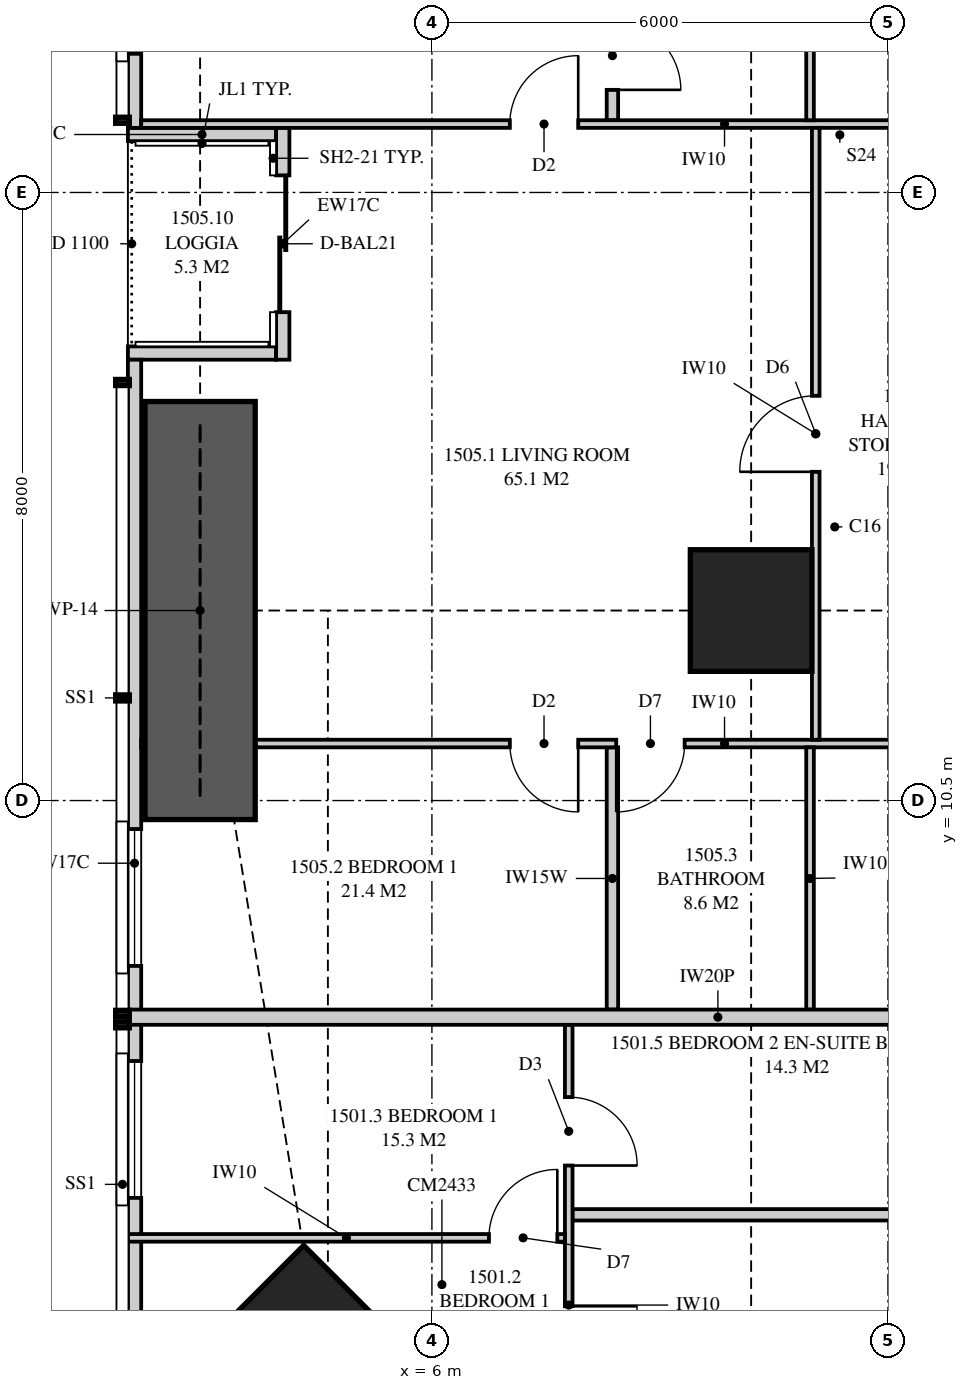
"""IFC4 building model, lengths in metres.
Left out: names, types, materials, properties, quantities, classifications, styles, units other than length and angle.
Written with IfcOpenShell. Run it as: python <this file> out.ifc"""

import sys

from ifc_helpers import new_model, si_unit, direction, frame, frame_2d, origin, origin_2d, place, context, subcontext, project, spatial, polyline, rectangle, outline, extrude, element, fill, save


model = new_model("IFC4")
c1 = context("Model", 3, precision=1e-05, world=origin(), true_north=direction((0.0, 1.0)))
c2 = subcontext(c1, "Body", "Model", "MODEL_VIEW")
j1 = project(units=[si_unit("LENGTHUNIT", "METRE"), si_unit("PLANEANGLEUNIT", "RADIAN")], contexts=[c1])
p1 = place(None, origin())
s1 = spatial("IfcSite", under=j1, at=p1, CompositionType="ELEMENT")
p2 = place(p1, origin())
s2 = spatial("IfcBuilding", under=s1, at=p2, CompositionType="ELEMENT")
p3 = place(p2, frame((0.0, 0.0, 57.85)))
s3 = spatial("IfcBuildingStorey", under=s2, at=p3, CompositionType="ELEMENT", Elevation=57.85)
p4 = place(p3, frame((4.631, 2.631, 0.0), z_axis=(0.0, 0.0, 1.0), x_axis=(0.707106781187, 0.707106781187, 0.0)))
e1 = element("IfcColumn", 1, at=p4, inside=s3, PredefinedType="COLUMN", context=c2, shape_type="SweptSolid", body=[
    extrude(rectangle(XDim=2.4, YDim=3.3, at=origin_2d()), origin(), (0.0, 0.0, 1.0), 3.35),
])
p5 = place(p3, frame((10.2, 13.0, 0.0), z_axis=(0.0, 0.0, 1.0), x_axis=(1.0, 0.0, 0.0)))
e2 = element("IfcColumn", 2, at=p5, inside=s3, PredefinedType="COLUMN", context=c2, shape_type="SweptSolid", body=[
    extrude(rectangle(XDim=1.6, YDim=1.6, at=origin_2d()), origin(), (0.0, 0.0, 1.0), 3.35),
])
p6 = place(p3, frame((2.087, 34.949, 0.0), z_axis=(0.0, 0.0, 1.0), x_axis=(0.0, -1.0, 0.0)))
e3 = element("IfcWall", 3, at=p6, inside=s3, PredefinedType="SOLIDWALL", context=c2, shape_type="SweptSolid", body=[
    extrude(outline(polyline([(0.0, 0.0), (15.599, 0.0), (15.599, 2.15), (9.949, 2.15), (9.949, 3.11), (9.823, 3.11), (9.823, 2.15), (9.73, 2.15), (9.73, 3.11), (0.0, 3.11), (0.0, 0.0)])), frame((0.0, 0.087, 0.0), z_axis=(0.0, -1.0, 0.0), x_axis=(1.0, 0.0, 0.0)), (0.0, 0.0, 1.0), 0.175),
])
p7 = place(p6, frame((2.722, 0.0, 0.4)))
e4 = element("IfcOpeningElement", 4, at=p7, cuts=e3, PredefinedType="OPENING", context=c2, shape_type="SweptSolid", body=[
    extrude(rectangle(XDim=1.8, YDim=1.7, at=frame_2d((0.9, 0.85))), frame((0.0, 0.097, 0.0), z_axis=(0.0, -1.0, 0.0), x_axis=(1.0, 0.0, 0.0)), (0.0, 0.0, 1.0), 0.195),
])
p8 = place(p6, frame((5.899, 0.0, 0.4)))
e5 = element("IfcOpeningElement", 5, at=p8, cuts=e3, PredefinedType="OPENING", context=c2, shape_type="SweptSolid", body=[
    extrude(rectangle(XDim=1.2, YDim=1.7, at=frame_2d((0.6, 0.85))), frame((0.0, 0.097, 0.0), z_axis=(0.0, -1.0, 0.0), x_axis=(1.0, 0.0, 0.0)), (0.0, 0.0, 1.0), 0.195),
])
p9 = place(p6, frame((12.824, 0.0, 0.4)))
e6 = element("IfcOpeningElement", 6, at=p9, cuts=e3, PredefinedType="OPENING", context=c2, shape_type="SweptSolid", body=[
    extrude(rectangle(XDim=1.8, YDim=1.7, at=frame_2d((0.9, 0.85))), frame((0.0, 0.097, 0.0), z_axis=(0.0, -1.0, 0.0), x_axis=(1.0, 0.0, 0.0)), (0.0, 0.0, 1.0), 0.195),
])
p10 = place(p3, frame((2.087, 16.3, 0.0), z_axis=(0.0, 0.0, 1.0), x_axis=(0.0, -1.0, 0.0)))
e7 = element("IfcWall", 7, at=p10, inside=s3, PredefinedType="SOLIDWALL", context=c2, shape_type="SweptSolid", body=[
    extrude(outline(polyline([(0.0, 0.0), (13.249, 0.0), (13.249, 3.11), (3.519, 3.11), (3.519, 2.15), (3.426, 2.15), (3.426, 3.11), (3.3, 3.11), (3.3, 2.15), (0.0, 2.15), (0.0, 0.0)])), frame((0.0, 0.087, 0.0), z_axis=(0.0, -1.0, 0.0), x_axis=(1.0, 0.0, 0.0)), (0.0, 0.0, 1.0), 0.175),
])
p11 = place(p10, frame((6.175, 0.0, 0.4)))
e8 = element("IfcOpeningElement", 8, at=p11, cuts=e7, PredefinedType="OPENING", context=c2, shape_type="SweptSolid", body=[
    extrude(rectangle(XDim=1.8, YDim=1.7, at=frame_2d((0.9, 0.85))), frame((0.0, 0.097, 0.0), z_axis=(0.0, -1.0, 0.0), x_axis=(1.0, 0.0, 0.0)), (0.0, 0.0, 1.0), 0.195),
])
p12 = place(p10, frame((9.227, 0.0, 0.4)))
e9 = element("IfcOpeningElement", 9, at=p12, cuts=e7, PredefinedType="OPENING", context=c2, shape_type="SweptSolid", body=[
    extrude(rectangle(XDim=1.8, YDim=1.7, at=frame_2d((0.9, 0.85))), frame((0.0, 0.097, 0.0), z_axis=(0.0, -1.0, 0.0), x_axis=(1.0, 0.0, 0.0)), (0.0, 0.0, 1.0), 0.195),
])
p13 = place(p3, frame((4.038, 19.35, 0.0), z_axis=(0.0, 0.0, 1.0), x_axis=(0.0, -1.0, 0.0)))
e10 = element("IfcWall", 10, at=p13, inside=s3, PredefinedType="SOLIDWALL", context=c2, shape_type="SweptSolid", body=[
    extrude(rectangle(XDim=3.05, YDim=0.175, at=frame_2d((1.525, 0.0))), origin(), (0.0, 0.0, 1.0), 3.11),
])
p14 = place(p13, frame((0.625, 0.0, 0.0)))
e11 = element("IfcOpeningElement", 11, at=p14, cuts=e10, PredefinedType="OPENING", context=c2, shape_type="SweptSolid", body=[
    extrude(rectangle(XDim=1.8, YDim=2.1, at=frame_2d((0.9, 1.05))), frame((0.0, 0.097, 0.0), z_axis=(0.0, -1.0, 0.0), x_axis=(1.0, 0.0, 0.0)), (0.0, 0.0, 1.0), 0.195),
])
for number, where, z_axis, x_axis in (
    (12, (2.0, 19.262, 0.0), (0.0, 0.0, 1.0), (1.0, 0.0, 0.0)),
    (13, (2.0, 16.387, 0.0), (0.0, 0.0, 1.0), (1.0, 0.0, 0.0)),
):
    element("IfcWall", number, at=place(p3, frame(where, z_axis=z_axis, x_axis=x_axis)), inside=s3, PredefinedType="SOLIDWALL", context=c2, shape_type="SweptSolid", body=[
        extrude(outline(polyline([(0.0, 0.0), (1.95, 0.0), (1.95, 3.11), (1.75, 3.11), (1.75, 2.15), (0.15, 2.15), (0.15, 3.11), (0.0, 3.11), (0.0, 0.0)])), frame((0.0, 0.087, 0.0), z_axis=(0.0, -1.0, 0.0), x_axis=(1.0, 0.0, 0.0)), (0.0, 0.0, 1.0), 0.175),
    ])
p15 = place(p3, frame((7.8, 0.175, 0.0), z_axis=(0.0, 0.0, 1.0), x_axis=(0.0, 1.0, 0.0)))
e14 = element("IfcWall", 14, at=p15, inside=s3, PredefinedType="PARTITIONING", context=c2, shape_type="SweptSolid", body=[
    extrude(outline(polyline([(0.0, 0.0), (7.375, 0.0), (7.375, 3.11), (2.697, 3.11), (2.697, 2.15), (0.943, 2.15), (0.943, 3.11), (0.0, 3.11), (0.0, 0.0)])), frame((0.0, 0.05, 0.0), z_axis=(0.0, -1.0, 0.0), x_axis=(1.0, 0.0, 0.0)), (0.0, 0.0, 1.0), 0.1),
])
p16 = place(p15, frame((2.772, 0.0, 0.0)))
e15 = element("IfcOpeningElement", 15, at=p16, cuts=e14, PredefinedType="OPENING", context=c2, shape_type="SweptSolid", body=[
    extrude(rectangle(XDim=0.9, YDim=2.1, at=frame_2d((0.45, 1.05))), frame((0.0, 0.06, 0.0), z_axis=(0.0, -1.0, 0.0), x_axis=(1.0, 0.0, 0.0)), (0.0, 0.0, 1.0), 0.12),
])
p17 = place(p15, frame((5.523, 0.0, 0.0)))
e16 = element("IfcOpeningElement", 16, at=p17, cuts=e14, PredefinedType="OPENING", context=c2, shape_type="SweptSolid", body=[
    extrude(rectangle(XDim=0.9, YDim=2.1, at=frame_2d((0.45, 1.05))), frame((0.0, 0.06, 0.0), z_axis=(0.0, -1.0, 0.0), x_axis=(1.0, 0.0, 0.0)), (0.0, 0.0, 1.0), 0.12),
])
p18 = place(p3, frame((2.0, 4.747, 0.0), z_axis=(0.0, 0.0, 1.0), x_axis=(1.0, 0.0, 0.0)))
e17 = element("IfcWall", 17, at=p18, inside=s3, PredefinedType="PARTITIONING", context=c2, shape_type="SweptSolid", body=[
    extrude(outline(polyline([(0.0, 0.0), (5.75, 0.0), (5.75, 3.11), (3.16, 3.11), (3.16, 2.15), (1.417, 2.15), (1.417, 3.11), (0.0, 3.11), (0.0, 0.0)])), frame((0.0, 0.05, 0.0), z_axis=(0.0, -1.0, 0.0), x_axis=(1.0, 0.0, 0.0)), (0.0, 0.0, 1.0), 0.1),
])
p19 = place(p18, frame((4.75, 0.0, 0.0)))
e18 = element("IfcOpeningElement", 18, at=p19, cuts=e17, PredefinedType="OPENING", context=c2, shape_type="SweptSolid", body=[
    extrude(rectangle(XDim=0.9, YDim=2.1, at=frame_2d((0.45, 1.05))), frame((0.0, 0.06, 0.0), z_axis=(0.0, -1.0, 0.0), x_axis=(1.0, 0.0, 0.0)), (0.0, 0.0, 1.0), 0.12),
])
p20 = place(p3, frame((7.85, 5.05, 0.0), z_axis=(0.0, 0.0, 1.0), x_axis=(1.0, 0.0, 0.0)))
e19 = element("IfcWall", 19, at=p20, inside=s3, PredefinedType="PLUMBINGWALL", context=c2, shape_type="SweptSolid", body=[
    extrude(outline(polyline([(0.0, 0.0), (5.9, 0.0), (5.9, 3.11), (5.462, 3.11), (5.462, 2.541), (4.838, 2.541), (4.838, 3.11), (3.635, 3.11), (3.635, 2.51), (1.065, 2.51), (1.065, 3.11), (0.0, 3.11), (0.0, 0.0)])), frame((0.0, 0.075, 0.0), z_axis=(0.0, -1.0, 0.0), x_axis=(1.0, 0.0, 0.0)), (0.0, 0.0, 1.0), 0.15),
])
p21 = place(p20, frame((4.6, 0.0, 0.0)))
e20 = element("IfcOpeningElement", 20, at=p21, cuts=e19, PredefinedType="OPENING", context=c2, shape_type="SweptSolid", body=[
    extrude(rectangle(XDim=0.9, YDim=2.1, at=frame_2d((0.45, 1.05))), frame((0.0, 0.085, 0.0), z_axis=(0.0, -1.0, 0.0), x_axis=(1.0, 0.0, 0.0)), (0.0, 0.0, 1.0), 0.17),
])
p22 = place(p3, frame((2.0, 7.65, 0.0), z_axis=(0.0, 0.0, 1.0), x_axis=(1.0, 0.0, 0.0)))
e21 = element("IfcWall", 21, at=p22, inside=s3, PredefinedType="PARTITIONING", context=c2, shape_type="SweptSolid", body=[
    extrude(outline(polyline([(0.0, 0.0), (15.525, 0.0), (15.525, 3.11), (11.337, 3.11), (11.337, 2.541), (10.663, 2.541), (10.663, 3.11), (9.51, 3.11), (9.51, 2.51), (6.89, 2.51), (6.89, 3.11), (2.969, 3.11), (2.969, 2.541), (2.74, 2.541), (2.74, 2.15), (0.896, 2.15), (0.896, 3.11), (0.0, 3.11), (0.0, 0.0)])), frame((0.0, 0.1, 0.0), z_axis=(0.0, -1.0, 0.0), x_axis=(1.0, 0.0, 0.0)), (0.0, 0.0, 1.0), 0.2),
])
p23 = place(p3, frame((2.175, 11.25, 0.0), z_axis=(0.0, 0.0, 1.0), x_axis=(1.0, 0.0, 0.0)))
e22 = element("IfcWall", 22, at=p23, inside=s3, PredefinedType="PARTITIONING", context=c2, shape_type="SweptSolid", body=[
    extrude(outline(polyline([(0.188, 3.11), (0.0, 3.11), (0.0, 0.0), (0.529, 0.0), (0.529, 0.273), (1.021, 0.273), (1.021, 0.0), (15.35, 0.0), (15.35, 3.11), (11.112, 3.11), (11.112, 2.541), (10.538, 2.541), (10.538, 3.11), (9.285, 3.11), (9.285, 2.51), (6.765, 2.51), (6.765, 3.11), (2.744, 3.11), (2.744, 2.541), (2.169, 2.541), (2.169, 3.11), (1.93, 3.11), (1.93, 2.15), (1.021, 2.15), (1.021, 1.876), (0.529, 1.876), (0.529, 2.15), (0.188, 2.15), (0.188, 3.11)])), frame((0.0, 0.05, 0.0), z_axis=(0.0, -1.0, 0.0), x_axis=(1.0, 0.0, 0.0)), (0.0, 0.0, 1.0), 0.1),
])
p24 = place(p23, frame((4.85, 0.0, 0.0)))
e23 = element("IfcOpeningElement", 23, at=p24, cuts=e22, PredefinedType="OPENING", context=c2, shape_type="SweptSolid", body=[
    extrude(rectangle(XDim=0.9, YDim=2.1, at=frame_2d((0.45, 1.05))), frame((0.0, 0.06, 0.0), z_axis=(0.0, -1.0, 0.0), x_axis=(1.0, 0.0, 0.0)), (0.0, 0.0, 1.0), 0.12),
])
p25 = place(p23, frame((6.25, 0.0, 0.0)))
e24 = element("IfcOpeningElement", 24, at=p25, cuts=e22, PredefinedType="OPENING", context=c2, shape_type="SweptSolid", body=[
    extrude(rectangle(XDim=0.9, YDim=2.1, at=frame_2d((0.45, 1.05))), frame((0.0, 0.06, 0.0), z_axis=(0.0, -1.0, 0.0), x_axis=(1.0, 0.0, 0.0)), (0.0, 0.0, 1.0), 0.12),
])
p26 = place(p23, frame((11.675, 0.0, 0.0)))
e25 = element("IfcOpeningElement", 25, at=p26, cuts=e22, PredefinedType="OPENING", context=c2, shape_type="SweptSolid", body=[
    extrude(rectangle(XDim=0.7, YDim=2.1, at=frame_2d((0.35, 1.05))), frame((0.0, 0.06, 0.0), z_axis=(0.0, -1.0, 0.0), x_axis=(1.0, 0.0, 0.0)), (0.0, 0.0, 1.0), 0.12),
])
p27 = place(p3, frame((2.175, 19.4, 0.0), z_axis=(0.0, 0.0, 1.0), x_axis=(1.0, 0.0, 0.0)))
e26 = element("IfcWall", 26, at=p27, inside=s3, PredefinedType="PARTITIONING", context=c2, shape_type="SweptSolid", body=[
    extrude(outline(polyline([(0.0, 0.0), (15.35, 0.0), (15.35, 3.11), (9.285, 3.11), (9.285, 2.51), (6.765, 2.51), (6.765, 3.11), (1.635, 3.11), (1.635, 2.15), (0.0, 2.15), (0.0, 3.11), (0.0, 0.0)])), frame((0.0, 0.05, 0.0), z_axis=(0.0, -1.0, 0.0), x_axis=(1.0, 0.0, 0.0)), (0.0, 0.0, 1.0), 0.1),
])
p28 = place(p27, frame((4.85, 0.0, 0.0)))
e27 = element("IfcOpeningElement", 27, at=p28, cuts=e26, PredefinedType="OPENING", context=c2, shape_type="SweptSolid", body=[
    extrude(rectangle(XDim=0.9, YDim=2.1, at=frame_2d((0.45, 1.05))), frame((0.0, 0.06, 0.0), z_axis=(0.0, -1.0, 0.0), x_axis=(1.0, 0.0, 0.0)), (0.0, 0.0, 1.0), 0.12),
])
p29 = place(p27, frame((11.675, 0.0, 0.0)))
e28 = element("IfcOpeningElement", 28, at=p29, cuts=e26, PredefinedType="OPENING", context=c2, shape_type="SweptSolid", body=[
    extrude(rectangle(XDim=0.7, YDim=2.1, at=frame_2d((0.35, 1.05))), frame((0.0, 0.06, 0.0), z_axis=(0.0, -1.0, 0.0), x_axis=(1.0, 0.0, 0.0)), (0.0, 0.0, 1.0), 0.12),
])
p30 = place(p3, frame((8.375, 7.75, 0.0), z_axis=(0.0, 0.0, 1.0), x_axis=(0.0, 1.0, 0.0)))
e29 = element("IfcWall", 29, at=p30, inside=s3, PredefinedType="PLUMBINGWALL", context=c2, shape_type="SweptSolid", body=[
    extrude(rectangle(XDim=3.45, YDim=0.15, at=frame_2d((1.725, 0.0))), origin(), (0.0, 0.0, 1.0), 3.11),
])
p31 = place(p3, frame((10.975, 7.75, 0.0), z_axis=(0.0, 0.0, 1.0), x_axis=(0.0, 1.0, 0.0)))
e30 = element("IfcWall", 30, at=p31, inside=s3, PredefinedType="PARTITIONING", context=c2, shape_type="SweptSolid", body=[
    extrude(outline(polyline([(0.0, 0.0), (3.45, 0.0), (3.45, 3.11), (3.45, 2.51), (0.0, 2.51), (0.0, 3.11), (0.0, 0.0)])), frame((0.0, 0.05, 0.0), z_axis=(0.0, -1.0, 0.0), x_axis=(1.0, 0.0, 0.0)), (0.0, 0.0, 1.0), 0.1),
])
p32 = place(p3, frame((8.375, 19.45, 0.0), z_axis=(0.0, 0.0, 1.0), x_axis=(0.0, 1.0, 0.0)))
e31 = element("IfcWall", 31, at=p32, inside=s3, PredefinedType="PLUMBINGWALL", context=c2, shape_type="SweptSolid", body=[
    extrude(rectangle(XDim=4.55, YDim=0.15, at=frame_2d((2.275, 0.0))), origin(), (0.0, 0.0, 1.0), 3.11),
])
p33 = place(p32, frame((0.4, 0.0, 0.0)))
e32 = element("IfcOpeningElement", 32, at=p33, cuts=e31, PredefinedType="OPENING", context=c2, shape_type="SweptSolid", body=[
    extrude(rectangle(XDim=0.9, YDim=2.1, at=frame_2d((0.45, 1.05))), frame((0.0, 0.085, 0.0), z_axis=(0.0, -1.0, 0.0), x_axis=(1.0, 0.0, 0.0)), (0.0, 0.0, 1.0), 0.17),
])
p34 = place(p3, frame((10.975, 19.45, 0.0), z_axis=(0.0, 0.0, 1.0), x_axis=(0.0, 1.0, 0.0)))
e33 = element("IfcWall", 33, at=p34, inside=s3, PredefinedType="PARTITIONING", context=c2, shape_type="SweptSolid", body=[
    extrude(outline(polyline([(0.0, 0.0), (4.55, 0.0), (4.55, 3.11), (4.55, 2.51), (0.0, 2.51), (0.0, 3.11), (0.0, 0.0)])), frame((0.0, 0.05, 0.0), z_axis=(0.0, -1.0, 0.0), x_axis=(1.0, 0.0, 0.0)), (0.0, 0.0, 1.0), 0.1),
])
p35 = place(p3, frame((11.05, 11.3, 0.0), z_axis=(0.0, 0.0, 1.0), x_axis=(0.0, 1.0, 0.0)))
e34 = element("IfcWall", 34, at=p35, inside=s3, PredefinedType="PARTITIONING", context=c2, shape_type="SweptSolid", body=[
    extrude(rectangle(XDim=8.05, YDim=0.1, at=frame_2d((4.025, 0.0))), origin(), (0.0, 0.0, 1.0), 2.51),
])
p36 = place(p35, frame((3.525, 0.0, 0.0)))
e35 = element("IfcOpeningElement", 35, at=p36, cuts=e34, PredefinedType="OPENING", context=c2, shape_type="SweptSolid", body=[
    extrude(rectangle(XDim=1.0, YDim=2.1, at=frame_2d((0.5, 1.05))), frame((0.0, 0.06, 0.0), z_axis=(0.0, -1.0, 0.0), x_axis=(1.0, 0.0, 0.0)), (0.0, 0.0, 1.0), 0.12),
])
p37 = place(p3, frame((2.95, 10.25, 0.0), z_axis=(0.0, 0.0, 1.0), x_axis=(0.0, 1.0, 0.0)))
e36 = element("IfcWall", 36, at=p37, inside=s3, PredefinedType="SHEAR", context=c2, shape_type="SweptSolid", body=[
    extrude(rectangle(XDim=5.5, YDim=1.45, at=frame_2d((2.75, 0.0))), origin(), (0.0, 0.0, 1.0), 3.35),
])
p38 = place(p9, origin())
e37 = element("IfcWindow", 37, at=p38, inside=s3, PartitioningType="SINGLE_PANEL", PredefinedType="WINDOW", context=c2, shape_type="SweptSolid", body=[
    extrude(rectangle(XDim=1.8, YDim=1.7, at=frame_2d((0.9, 0.85))), frame((0.0, 0.03, 0.0), z_axis=(0.0, -1.0, 0.0), x_axis=(1.0, 0.0, 0.0)), (0.0, 0.0, 1.0), 0.06),
])
fill(e6, e37)
p39 = place(p14, origin())
e38 = element("IfcDoor", 38, at=p39, inside=s3, OperationType="SLIDING_TO_LEFT", PredefinedType="DOOR", context=c2, shape_type="SweptSolid", body=[
    extrude(rectangle(XDim=1.8, YDim=2.1, at=frame_2d((0.9, 1.05))), frame((0.0, 0.025, 0.0), z_axis=(0.0, -1.0, 0.0), x_axis=(1.0, 0.0, 0.0)), (0.0, 0.0, 1.0), 0.05),
])
fill(e11, e38)
p40 = place(p11, origin())
e39 = element("IfcWindow", 39, at=p40, inside=s3, PartitioningType="SINGLE_PANEL", PredefinedType="WINDOW", context=c2, shape_type="SweptSolid", body=[
    extrude(rectangle(XDim=1.8, YDim=1.7, at=frame_2d((0.9, 0.85))), frame((0.0, 0.03, 0.0), z_axis=(0.0, -1.0, 0.0), x_axis=(1.0, 0.0, 0.0)), (0.0, 0.0, 1.0), 0.06),
])
fill(e8, e39)
p41 = place(p12, origin())
e40 = element("IfcWindow", 40, at=p41, inside=s3, PartitioningType="SINGLE_PANEL", PredefinedType="WINDOW", context=c2, shape_type="SweptSolid", body=[
    extrude(rectangle(XDim=1.8, YDim=1.7, at=frame_2d((0.9, 0.85))), frame((0.0, 0.03, 0.0), z_axis=(0.0, -1.0, 0.0), x_axis=(1.0, 0.0, 0.0)), (0.0, 0.0, 1.0), 0.06),
])
fill(e9, e40)
p42 = place(p19, origin())
e41 = element("IfcDoor", 41, at=p42, inside=s3, OperationType="SINGLE_SWING_RIGHT", PredefinedType="DOOR", context=c2, shape_type="SweptSolid", body=[
    extrude(rectangle(XDim=0.9, YDim=2.1, at=frame_2d((0.45, 1.05))), frame((0.0, 0.025, 0.0), z_axis=(0.0, -1.0, 0.0), x_axis=(1.0, 0.0, 0.0)), (0.0, 0.0, 1.0), 0.05),
])
fill(e18, e41)
p43 = place(p16, frame((0.9, 0.0, 0.0), z_axis=(0.0, 0.0, 1.0), x_axis=(-1.0, 0.0, 0.0)))
e42 = element("IfcDoor", 42, at=p43, inside=s3, OperationType="SINGLE_SWING_LEFT", PredefinedType="DOOR", context=c2, shape_type="SweptSolid", body=[
    extrude(rectangle(XDim=0.9, YDim=2.1, at=frame_2d((0.45, 1.05))), frame((0.0, 0.025, 0.0), z_axis=(0.0, -1.0, 0.0), x_axis=(1.0, 0.0, 0.0)), (0.0, 0.0, 1.0), 0.05),
])
fill(e15, e42)
p44 = place(p17, frame((0.9, 0.0, 0.0), z_axis=(0.0, 0.0, 1.0), x_axis=(-1.0, 0.0, 0.0)))
e43 = element("IfcDoor", 43, at=p44, inside=s3, OperationType="SINGLE_SWING_RIGHT", PredefinedType="DOOR", context=c2, shape_type="SweptSolid", body=[
    extrude(rectangle(XDim=0.9, YDim=2.1, at=frame_2d((0.45, 1.05))), frame((0.0, 0.025, 0.0), z_axis=(0.0, -1.0, 0.0), x_axis=(1.0, 0.0, 0.0)), (0.0, 0.0, 1.0), 0.05),
])
fill(e16, e43)
p45 = place(p24, frame((0.9, 0.0, 0.0), z_axis=(0.0, 0.0, 1.0), x_axis=(-1.0, 0.0, 0.0)))
e44 = element("IfcDoor", 44, at=p45, inside=s3, OperationType="SINGLE_SWING_LEFT", PredefinedType="DOOR", context=c2, shape_type="SweptSolid", body=[
    extrude(rectangle(XDim=0.9, YDim=2.1, at=frame_2d((0.45, 1.05))), frame((0.0, 0.025, 0.0), z_axis=(0.0, -1.0, 0.0), x_axis=(1.0, 0.0, 0.0)), (0.0, 0.0, 1.0), 0.05),
])
fill(e23, e44)
p46 = place(p25, frame((0.9, 0.0, 0.0), z_axis=(0.0, 0.0, 1.0), x_axis=(-1.0, 0.0, 0.0)))
e45 = element("IfcDoor", 45, at=p46, inside=s3, OperationType="SINGLE_SWING_RIGHT", PredefinedType="DOOR", context=c2, shape_type="SweptSolid", body=[
    extrude(rectangle(XDim=0.9, YDim=2.1, at=frame_2d((0.45, 1.05))), frame((0.0, 0.025, 0.0), z_axis=(0.0, -1.0, 0.0), x_axis=(1.0, 0.0, 0.0)), (0.0, 0.0, 1.0), 0.05),
])
fill(e24, e45)
p47 = place(p28, origin())
e46 = element("IfcDoor", 46, at=p47, inside=s3, OperationType="SINGLE_SWING_RIGHT", PredefinedType="DOOR", context=c2, shape_type="SweptSolid", body=[
    extrude(rectangle(XDim=0.9, YDim=2.1, at=frame_2d((0.45, 1.05))), frame((0.0, 0.025, 0.0), z_axis=(0.0, -1.0, 0.0), x_axis=(1.0, 0.0, 0.0)), (0.0, 0.0, 1.0), 0.05),
])
fill(e27, e46)
p48 = place(p33, frame((0.9, 0.0, 0.0), z_axis=(0.0, 0.0, 1.0), x_axis=(-1.0, 0.0, 0.0)))
e47 = element("IfcDoor", 47, at=p48, inside=s3, OperationType="SINGLE_SWING_RIGHT", PredefinedType="DOOR", context=c2, shape_type="SweptSolid", body=[
    extrude(rectangle(XDim=0.9, YDim=2.1, at=frame_2d((0.45, 1.05))), frame((0.0, 0.025, 0.0), z_axis=(0.0, -1.0, 0.0), x_axis=(1.0, 0.0, 0.0)), (0.0, 0.0, 1.0), 0.05),
])
fill(e32, e47)
p49 = place(p36, origin())
e48 = element("IfcDoor", 48, at=p49, inside=s3, OperationType="SINGLE_SWING_LEFT", PredefinedType="DOOR", context=c2, shape_type="SweptSolid", body=[
    extrude(rectangle(XDim=1.0, YDim=2.1, at=frame_2d((0.5, 1.05))), frame((0.0, 0.025, 0.0), z_axis=(0.0, -1.0, 0.0), x_axis=(1.0, 0.0, 0.0)), (0.0, 0.0, 1.0), 0.05),
])
fill(e35, e48)
save(model, sys.argv[1])
